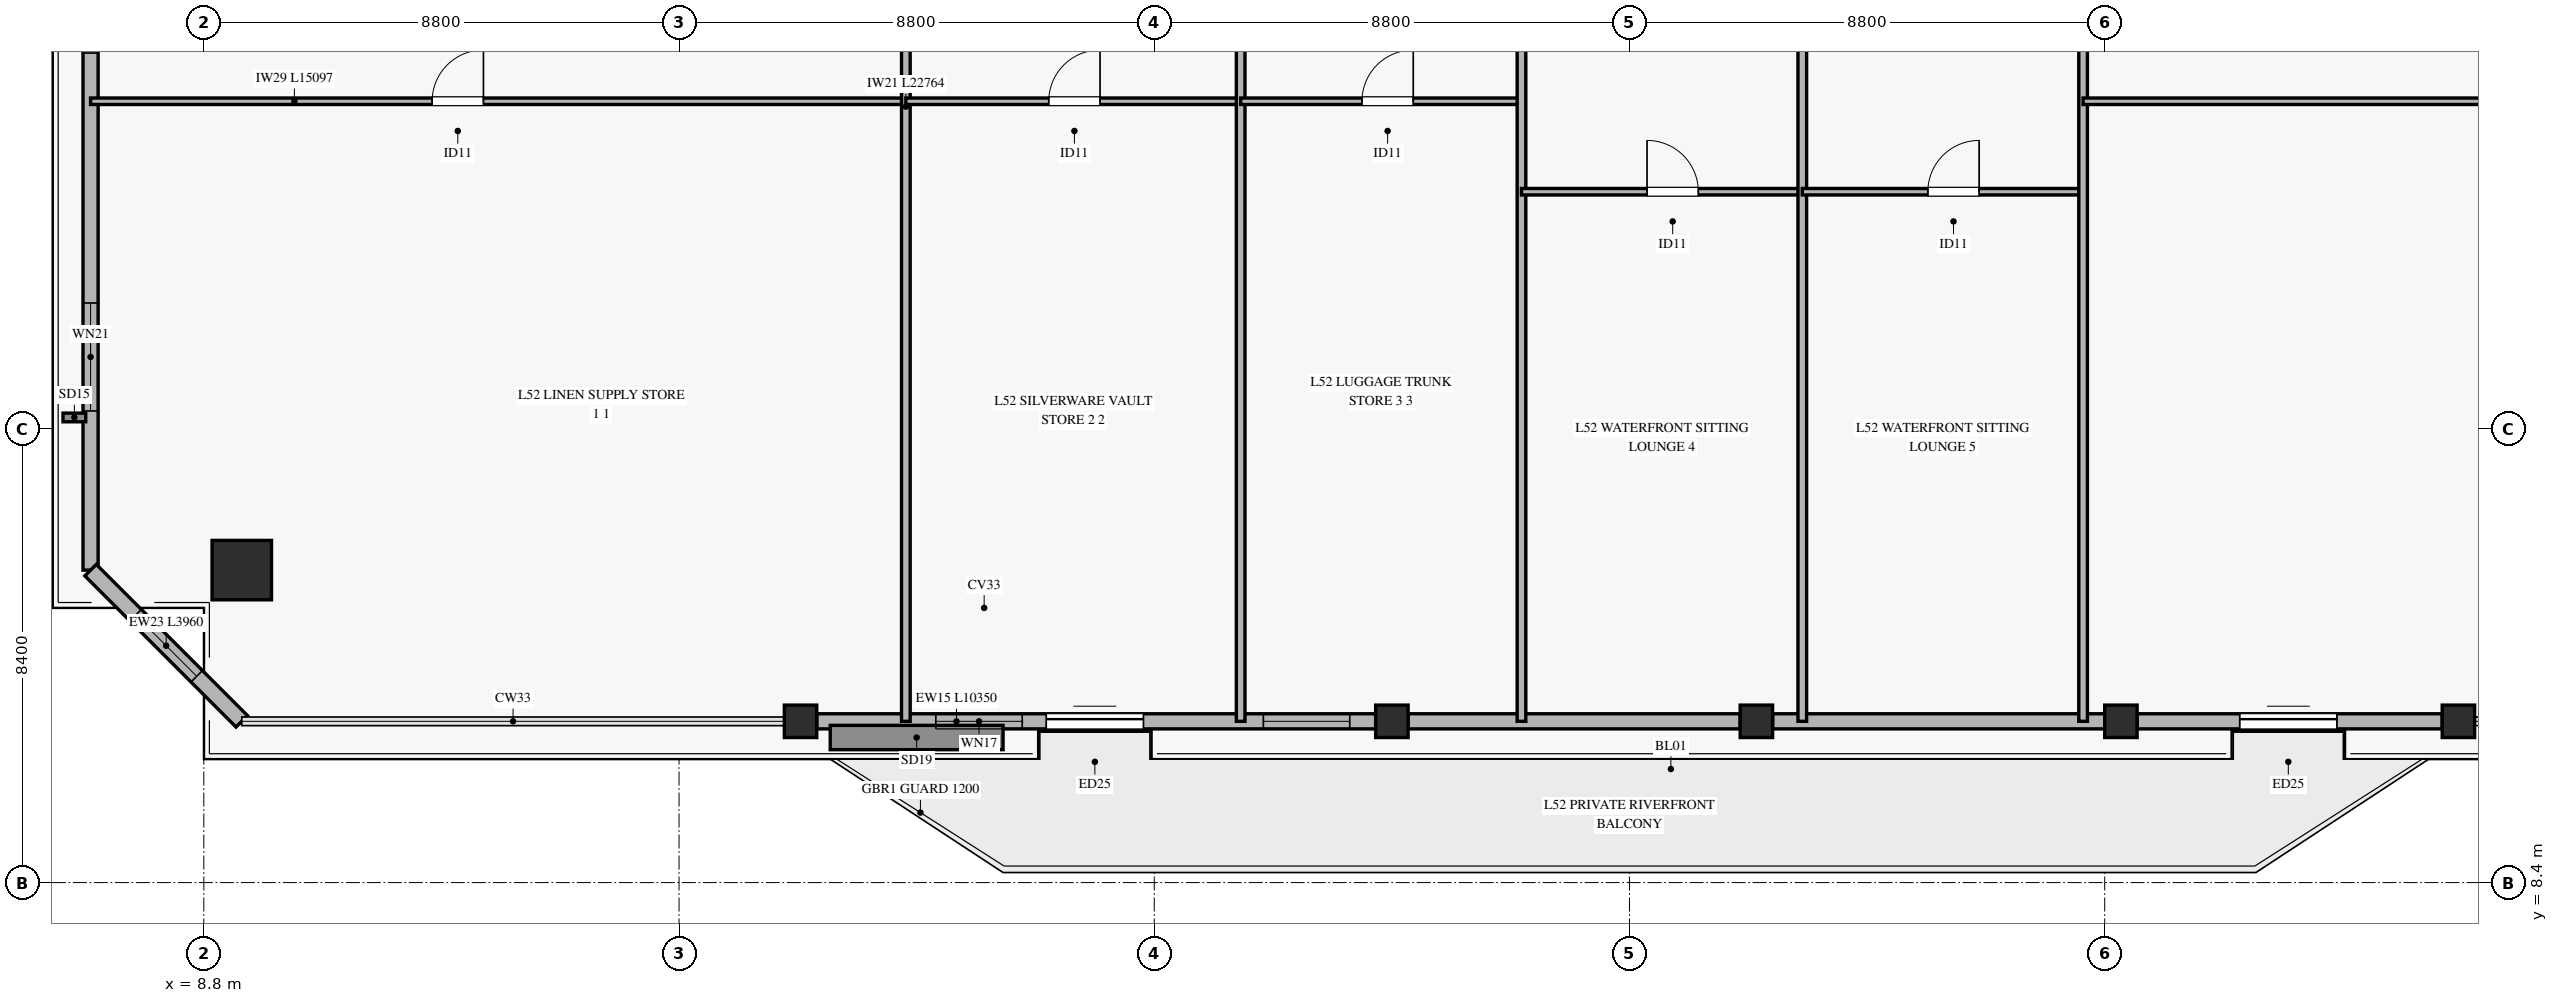
"""IFC4 building model, lengths in metres.
Left out: names, types, materials, properties, quantities, classifications, styles, units other than length and angle.
Written with IfcOpenShell. Run it as: python <this file> out.ifc"""

import sys

from ifc_helpers import new_model, si_unit, direction, frame, frame_2d, origin, origin_2d, place, context, subcontext, project, spatial, rectangle, hollow_rectangle, extrude, source, transform, mapped, element, fill, save


model = new_model("IFC4")
c1 = context("Model", 3, precision=1e-05, world=origin(), true_north=direction((0.0, 1.0)))
c2 = subcontext(c1, "Body", "Model", "MODEL_VIEW")
j1 = project(units=[si_unit("LENGTHUNIT", "METRE"), si_unit("PLANEANGLEUNIT", "RADIAN")], contexts=[c1])
p1 = place(None, origin())
s1 = spatial("IfcSite", under=j1, at=p1, CompositionType="ELEMENT")
p2 = place(p1, origin())
s2 = spatial("IfcBuilding", under=s1, at=p2, CompositionType="ELEMENT")
p3 = place(p2, frame((0.0, 0.0, 206.2)))
s3 = spatial("IfcBuildingStorey", under=s2, at=p3, CompositionType="ELEMENT", Elevation=206.2)
m1 = source(origin(), c2, "Body", "SweptSolid", [
    extrude(hollow_rectangle(XDim=1.1, YDim=1.1, WallThickness=0.05, at=origin_2d()), origin(), (0.0, 0.0, 1.0), 3.27),
])
p4 = place(p3, frame((9.503, 14.186, 0.0), z_axis=(0.0, 0.0, 1.0), x_axis=(1.0, 0.0, 0.0)))
e1 = element("IfcColumn", 1, at=p4, inside=s3, PredefinedType="COLUMN", context=c2, shape_type="MappedRepresentation", body=[
    mapped(m1, transform((0.0, 0.0, 0.0), x_axis=(1.0, 0.0, 0.0), y_axis=(0.0, 1.0, 0.0), z_axis=(0.0, 0.0, 1.0), scale=1.0)),
])
m2 = source(origin(), c2, "Body", "SweptSolid", [
    extrude(hollow_rectangle(XDim=0.6, YDim=0.6, WallThickness=0.028, at=origin_2d()), origin(), (0.0, 0.0, 1.0), 3.27),
])
for number, where, z_axis, x_axis in (
    (2, (19.85, 11.386, 0.0), (0.0, 0.0, 1.0), (1.0, 0.0, 0.0)),
    (3, (30.8, 11.386, 0.0), (0.0, 0.0, 1.0), (1.0, 0.0, 0.0)),
    (4, (37.55, 11.386, 0.0), (0.0, 0.0, 1.0), (1.0, 0.0, 0.0)),
    (5, (44.3, 11.386, 0.0), (0.0, 0.0, 1.0), (1.0, 0.0, 0.0)),
    (6, (50.55, 11.386, 0.0), (0.0, 0.0, 1.0), (1.0, 0.0, 0.0)),
):
    element("IfcColumn", number, at=place(p3, frame(where, z_axis=z_axis, x_axis=x_axis)), inside=s3, PredefinedType="COLUMN", context=c2, shape_type="MappedRepresentation", body=[
        mapped(m2, transform((0.0, 0.0, 0.0), x_axis=(1.0, 0.0, 0.0), y_axis=(0.0, 1.0, 0.0), z_axis=(0.0, 0.0, 1.0), scale=1.0)),
    ])
p5 = place(p3, frame((20.15, 11.386, 0.0), z_axis=(0.0, 0.0, 1.0), x_axis=(1.0, 0.0, 0.0)))
e7 = element("IfcWall", 7, at=p5, inside=s3, PredefinedType="SOLIDWALL", context=c2, shape_type="SweptSolid", body=[
    extrude(rectangle(XDim=10.35, YDim=0.28, at=frame_2d((5.175, 0.0))), origin(), (0.0, 0.0, 1.0), 2.75),
])
p6 = place(p5, frame((4.25, 0.0, 0.0)))
e8 = element("IfcOpeningElement", 8, at=p6, cuts=e7, PredefinedType="OPENING", context=c2, shape_type="SweptSolid", body=[
    extrude(rectangle(XDim=1.8, YDim=2.25, at=frame_2d((0.9, 1.125))), frame((0.0, 0.15, 0.0), z_axis=(0.0, -1.0, 0.0), x_axis=(1.0, 0.0, 0.0)), (0.0, 0.0, 1.0), 0.3),
])
p7 = place(p5, frame((2.205, 0.0, 0.45)))
e9 = element("IfcOpeningElement", 9, at=p7, cuts=e7, PredefinedType="OPENING", context=c2, shape_type="SweptSolid", body=[
    extrude(rectangle(XDim=1.6, YDim=2.0, at=frame_2d((0.8, 1.0))), frame((0.0, 0.15, 0.0), z_axis=(0.0, -1.0, 0.0), x_axis=(1.0, 0.0, 0.0)), (0.0, 0.0, 1.0), 0.3),
])
p8 = place(p5, frame((8.27, 0.0, 0.45)))
e10 = element("IfcOpeningElement", 10, at=p8, cuts=e7, PredefinedType="OPENING", context=c2, shape_type="SweptSolid", body=[
    extrude(rectangle(XDim=1.6, YDim=2.0, at=frame_2d((0.8, 1.0))), frame((0.0, 0.15, 0.0), z_axis=(0.0, -1.0, 0.0), x_axis=(1.0, 0.0, 0.0)), (0.0, 0.0, 1.0), 0.3),
])
for number, where, z_axis, x_axis in (
    (11, (31.1, 11.386, 0.0), (0.0, 0.0, 1.0), (1.0, 0.0, 0.0)),
    (12, (37.85, 11.386, 0.0), (0.0, 0.0, 1.0), (1.0, 0.0, 0.0)),
):
    element("IfcWall", number, at=place(p3, frame(where, z_axis=z_axis, x_axis=x_axis)), inside=s3, PredefinedType="SOLIDWALL", context=c2, shape_type="SweptSolid", body=[
        extrude(rectangle(XDim=6.15, YDim=0.28, at=frame_2d((3.075, 0.0))), origin(), (0.0, 0.0, 1.0), 2.75),
    ])
p9 = place(p3, frame((44.6, 11.386, 0.0), z_axis=(0.0, 0.0, 1.0), x_axis=(1.0, 0.0, 0.0)))
e13 = element("IfcWall", 13, at=p9, inside=s3, PredefinedType="SOLIDWALL", context=c2, shape_type="SweptSolid", body=[
    extrude(rectangle(XDim=5.65, YDim=0.28, at=frame_2d((2.825, 0.0))), origin(), (0.0, 0.0, 1.0), 2.75),
])
p10 = place(p9, frame((1.9, 0.0, 0.0)))
e14 = element("IfcOpeningElement", 14, at=p10, cuts=e13, PredefinedType="OPENING", context=c2, shape_type="SweptSolid", body=[
    extrude(rectangle(XDim=1.8, YDim=2.25, at=frame_2d((0.9, 1.125))), frame((0.0, 0.15, 0.0), z_axis=(0.0, -1.0, 0.0), x_axis=(1.0, 0.0, 0.0)), (0.0, 0.0, 1.0), 0.3),
])
p11 = place(p3, frame((6.703, 14.186, 0.0), z_axis=(0.0, 0.0, 1.0), x_axis=(0.0, 1.0, 0.0)))
e15 = element("IfcWall", 15, at=p11, inside=s3, PredefinedType="SOLIDWALL", context=c2, shape_type="SweptSolid", body=[
    extrude(rectangle(XDim=14.257, YDim=0.28, at=frame_2d((7.128, 0.0))), origin(), (0.0, 0.0, 1.0), 2.75),
])
p12 = place(p11, frame((2.947, 0.0, 0.45)))
e16 = element("IfcOpeningElement", 16, at=p12, cuts=e15, PredefinedType="OPENING", context=c2, shape_type="SweptSolid", body=[
    extrude(rectangle(XDim=2.0, YDim=2.0, at=frame_2d((1.0, 1.0))), frame((0.0, 0.15, 0.0), z_axis=(0.0, -1.0, 0.0), x_axis=(1.0, 0.0, 0.0)), (0.0, 0.0, 1.0), 0.3),
])
p13 = place(p11, frame((9.575, 0.0, 0.45)))
e17 = element("IfcOpeningElement", 17, at=p13, cuts=e15, PredefinedType="OPENING", context=c2, shape_type="SweptSolid", body=[
    extrude(rectangle(XDim=2.0, YDim=2.0, at=frame_2d((1.0, 1.0))), frame((0.0, 0.15, 0.0), z_axis=(0.0, -1.0, 0.0), x_axis=(1.0, 0.0, 0.0)), (0.0, 0.0, 1.0), 0.3),
])
p14 = place(p3, frame((6.703, 14.186, 0.0), z_axis=(0.0, 0.0, 1.0), x_axis=(0.707106781187, -0.707106781187, 0.0)))
e18 = element("IfcWall", 18, at=p14, inside=s3, PredefinedType="SOLIDWALL", context=c2, shape_type="SweptSolid", body=[
    extrude(rectangle(XDim=3.96, YDim=0.3, at=frame_2d((1.98, 0.0))), origin(), (0.0, 0.0, 1.0), 2.75),
])
p15 = place(p14, frame((1.18, 0.0, 0.45)))
e19 = element("IfcOpeningElement", 19, at=p15, cuts=e18, PredefinedType="OPENING", context=c2, shape_type="SweptSolid", body=[
    extrude(rectangle(XDim=1.6, YDim=2.0, at=frame_2d((0.8, 1.0))), frame((0.0, 0.16, 0.0), z_axis=(0.0, -1.0, 0.0), x_axis=(1.0, 0.0, 0.0)), (0.0, 0.0, 1.0), 0.32),
])
p16 = place(p3, frame((6.703, 22.868, 0.0), z_axis=(0.0, 0.0, 1.0), x_axis=(1.0, 0.0, 0.0)))
e20 = element("IfcWall", 20, at=p16, inside=s3, PredefinedType="PARTITIONING", context=c2, shape_type="SweptSolid", body=[
    extrude(rectangle(XDim=15.097, YDim=0.12, at=frame_2d((7.549, 0.0))), origin(), (0.0, 0.0, 1.0), 2.455),
])
p17 = place(p16, frame((6.325, 0.0, 0.0)))
e21 = element("IfcOpeningElement", 21, at=p17, cuts=e20, PredefinedType="OPENING", context=c2, shape_type="SweptSolid", body=[
    extrude(rectangle(XDim=0.95, YDim=2.1, at=frame_2d((0.475, 1.05))), frame((0.0, 0.07, 0.0), z_axis=(0.0, -1.0, 0.0), x_axis=(1.0, 0.0, 0.0)), (0.0, 0.0, 1.0), 0.14),
])
p18 = place(p3, frame((21.8, 11.386, 0.0), z_axis=(0.0, 0.0, 1.0), x_axis=(0.0, 1.0, 0.0)))
e22 = element("IfcWall", 22, at=p18, inside=s3, PredefinedType="PARTITIONING", context=c2, shape_type="SweptSolid", body=[
    extrude(rectangle(XDim=22.764, YDim=0.16, at=frame_2d((11.382, 0.0))), origin(), (0.0, 0.0, 1.0), 2.755),
])
p19 = place(p3, frame((21.8, 22.868, 0.0), z_axis=(0.0, 0.0, 1.0), x_axis=(1.0, 0.0, 0.0)))
e23 = element("IfcWall", 23, at=p19, inside=s3, PredefinedType="PARTITIONING", context=c2, shape_type="SweptSolid", body=[
    extrude(rectangle(XDim=6.2, YDim=0.12, at=frame_2d((3.1, 0.0))), origin(), (0.0, 0.0, 1.0), 3.27),
])
p20 = place(p19, frame((2.646, 0.0, 0.0)))
e24 = element("IfcOpeningElement", 24, at=p20, cuts=e23, PredefinedType="OPENING", context=c2, shape_type="SweptSolid", body=[
    extrude(rectangle(XDim=0.95, YDim=2.1, at=frame_2d((0.475, 1.05))), frame((0.0, 0.07, 0.0), z_axis=(0.0, -1.0, 0.0), x_axis=(1.0, 0.0, 0.0)), (0.0, 0.0, 1.0), 0.14),
])
p21 = place(p3, frame((28.0, 11.386, 0.0), z_axis=(0.0, 0.0, 1.0), x_axis=(0.0, 1.0, 0.0)))
e25 = element("IfcWall", 25, at=p21, inside=s3, PredefinedType="PARTITIONING", context=c2, shape_type="SweptSolid", body=[
    extrude(rectangle(XDim=22.764, YDim=0.16, at=frame_2d((11.382, 0.0))), origin(), (0.0, 0.0, 1.0), 2.755),
])
p22 = place(p3, frame((28.0, 22.868, 0.0), z_axis=(0.0, 0.0, 1.0), x_axis=(1.0, 0.0, 0.0)))
e26 = element("IfcWall", 26, at=p22, inside=s3, PredefinedType="PARTITIONING", context=c2, shape_type="SweptSolid", body=[
    extrude(rectangle(XDim=5.2, YDim=0.12, at=frame_2d((2.6, 0.0))), origin(), (0.0, 0.0, 1.0), 2.455),
])
p23 = place(p22, frame((2.246, 0.0, 0.0)))
e27 = element("IfcOpeningElement", 27, at=p23, cuts=e26, PredefinedType="OPENING", context=c2, shape_type="SweptSolid", body=[
    extrude(rectangle(XDim=0.95, YDim=2.1, at=frame_2d((0.475, 1.05))), frame((0.0, 0.07, 0.0), z_axis=(0.0, -1.0, 0.0), x_axis=(1.0, 0.0, 0.0)), (0.0, 0.0, 1.0), 0.14),
])
p24 = place(p3, frame((33.2, 11.386, 0.0), z_axis=(0.0, 0.0, 1.0), x_axis=(0.0, 1.0, 0.0)))
e28 = element("IfcWall", 28, at=p24, inside=s3, PredefinedType="PARTITIONING", context=c2, shape_type="SweptSolid", body=[
    extrude(rectangle(XDim=22.764, YDim=0.16, at=frame_2d((11.382, 0.0))), origin(), (0.0, 0.0, 1.0), 2.755),
])
p25 = place(p3, frame((33.2, 21.193, 0.0), z_axis=(0.0, 0.0, 1.0), x_axis=(1.0, 0.0, 0.0)))
e29 = element("IfcWall", 29, at=p25, inside=s3, PredefinedType="PARTITIONING", context=c2, shape_type="SweptSolid", body=[
    extrude(rectangle(XDim=5.2, YDim=0.12, at=frame_2d((2.6, 0.0))), origin(), (0.0, 0.0, 1.0), 2.455),
])
p26 = place(p25, frame((2.325, 0.0, 0.0)))
e30 = element("IfcOpeningElement", 30, at=p26, cuts=e29, PredefinedType="OPENING", context=c2, shape_type="SweptSolid", body=[
    extrude(rectangle(XDim=0.95, YDim=2.1, at=frame_2d((0.475, 1.05))), frame((0.0, 0.07, 0.0), z_axis=(0.0, -1.0, 0.0), x_axis=(1.0, 0.0, 0.0)), (0.0, 0.0, 1.0), 0.14),
])
p27 = place(p3, frame((38.4, 11.386, 0.0), z_axis=(0.0, 0.0, 1.0), x_axis=(0.0, 1.0, 0.0)))
e31 = element("IfcWall", 31, at=p27, inside=s3, PredefinedType="PARTITIONING", context=c2, shape_type="SweptSolid", body=[
    extrude(rectangle(XDim=22.764, YDim=0.16, at=frame_2d((11.382, 0.0))), origin(), (0.0, 0.0, 1.0), 2.755),
])
p28 = place(p3, frame((38.4, 21.193, 0.0), z_axis=(0.0, 0.0, 1.0), x_axis=(1.0, 0.0, 0.0)))
e32 = element("IfcWall", 32, at=p28, inside=s3, PredefinedType="PARTITIONING", context=c2, shape_type="SweptSolid", body=[
    extrude(rectangle(XDim=5.2, YDim=0.12, at=frame_2d((2.6, 0.0))), origin(), (0.0, 0.0, 1.0), 3.27),
])
p29 = place(p28, frame((2.325, 0.0, 0.0)))
e33 = element("IfcOpeningElement", 33, at=p29, cuts=e32, PredefinedType="OPENING", context=c2, shape_type="SweptSolid", body=[
    extrude(rectangle(XDim=0.95, YDim=2.1, at=frame_2d((0.475, 1.05))), frame((0.0, 0.07, 0.0), z_axis=(0.0, -1.0, 0.0), x_axis=(1.0, 0.0, 0.0)), (0.0, 0.0, 1.0), 0.14),
])
p30 = place(p3, frame((43.6, 11.386, 0.0), z_axis=(0.0, 0.0, 1.0), x_axis=(0.0, 1.0, 0.0)))
e34 = element("IfcWall", 34, at=p30, inside=s3, PredefinedType="PARTITIONING", context=c2, shape_type="SweptSolid", body=[
    extrude(rectangle(XDim=22.764, YDim=0.16, at=frame_2d((11.382, 0.0))), origin(), (0.0, 0.0, 1.0), 2.755),
])
p31 = place(p3, frame((43.6, 22.868, 0.0), z_axis=(0.0, 0.0, 1.0), x_axis=(1.0, 0.0, 0.0)))
e35 = element("IfcWall", 35, at=p31, inside=s3, PredefinedType="PARTITIONING", context=c2, shape_type="SweptSolid", body=[
    extrude(rectangle(XDim=20.098, YDim=0.12, at=frame_2d((10.049, 0.0))), origin(), (0.0, 0.0, 1.0), 2.455),
])
p32 = place(p31, frame((8.125, 0.0, 0.0)))
e36 = element("IfcOpeningElement", 36, at=p32, cuts=e35, PredefinedType="OPENING", context=c2, shape_type="SweptSolid", body=[
    extrude(rectangle(XDim=0.95, YDim=2.1, at=frame_2d((0.475, 1.05))), frame((0.0, 0.07, 0.0), z_axis=(0.0, -1.0, 0.0), x_axis=(1.0, 0.0, 0.0)), (0.0, 0.0, 1.0), 0.14),
])
m3 = source(origin(), c2, "Body", "SweptSolid", [
    extrude(rectangle(XDim=1.8, YDim=2.25, at=frame_2d((0.9, 1.125))), frame((0.0, 0.025, 0.0), z_axis=(0.0, -1.0, 0.0), x_axis=(1.0, 0.0, 0.0)), (0.0, 0.0, 1.0), 0.05),
])
p33 = place(p6, origin())
e37 = element("IfcDoor", 37, at=p33, inside=s3, OperationType="SLIDING_TO_LEFT", PredefinedType="DOOR", context=c2, shape_type="MappedRepresentation", body=[
    mapped(m3, transform((0.0, 0.0, 0.0), x_axis=(1.0, 0.0, 0.0), y_axis=(0.0, 1.0, 0.0), z_axis=(0.0, 0.0, 1.0), scale=1.0)),
])
fill(e8, e37)
m4 = source(origin(), c2, "Body", "SweptSolid", [
    extrude(rectangle(XDim=1.6, YDim=2.0, at=frame_2d((0.8, 1.0))), frame((0.0, 0.03, 0.0), z_axis=(0.0, -1.0, 0.0), x_axis=(1.0, 0.0, 0.0)), (0.0, 0.0, 1.0), 0.06),
])
p34 = place(p7, origin())
e38 = element("IfcWindow", 38, at=p34, inside=s3, PartitioningType="SINGLE_PANEL", PredefinedType="WINDOW", context=c2, shape_type="MappedRepresentation", body=[
    mapped(m4, transform((0.0, 0.0, 0.0), x_axis=(1.0, 0.0, 0.0), y_axis=(0.0, 1.0, 0.0), z_axis=(0.0, 0.0, 1.0), scale=1.0)),
])
fill(e9, e38)
p35 = place(p8, origin())
e39 = element("IfcWindow", 39, at=p35, inside=s3, PartitioningType="SINGLE_PANEL", PredefinedType="WINDOW", context=c2, shape_type="MappedRepresentation", body=[
    mapped(m4, transform((0.0, 0.0, 0.0), x_axis=(1.0, 0.0, 0.0), y_axis=(0.0, 1.0, 0.0), z_axis=(0.0, 0.0, 1.0), scale=1.0)),
])
fill(e10, e39)
p36 = place(p10, origin())
e40 = element("IfcDoor", 40, at=p36, inside=s3, OperationType="SLIDING_TO_LEFT", PredefinedType="DOOR", context=c2, shape_type="MappedRepresentation", body=[
    mapped(m3, transform((0.0, 0.0, 0.0), x_axis=(1.0, 0.0, 0.0), y_axis=(0.0, 1.0, 0.0), z_axis=(0.0, 0.0, 1.0), scale=1.0)),
])
fill(e14, e40)
m5 = source(origin(), c2, "Body", "SweptSolid", [
    extrude(rectangle(XDim=2.0, YDim=2.0, at=frame_2d((1.0, 1.0))), frame((0.0, 0.03, 0.0), z_axis=(0.0, -1.0, 0.0), x_axis=(1.0, 0.0, 0.0)), (0.0, 0.0, 1.0), 0.06),
])
p37 = place(p12, origin())
e41 = element("IfcWindow", 41, at=p37, inside=s3, PartitioningType="SINGLE_PANEL", PredefinedType="WINDOW", context=c2, shape_type="MappedRepresentation", body=[
    mapped(m5, transform((0.0, 0.0, 0.0), x_axis=(1.0, 0.0, 0.0), y_axis=(0.0, 1.0, 0.0), z_axis=(0.0, 0.0, 1.0), scale=1.0)),
])
fill(e16, e41)
p38 = place(p13, origin())
e42 = element("IfcWindow", 42, at=p38, inside=s3, PartitioningType="SINGLE_PANEL", PredefinedType="WINDOW", context=c2, shape_type="MappedRepresentation", body=[
    mapped(m5, transform((0.0, 0.0, 0.0), x_axis=(1.0, 0.0, 0.0), y_axis=(0.0, 1.0, 0.0), z_axis=(0.0, 0.0, 1.0), scale=1.0)),
])
fill(e17, e42)
p39 = place(p15, origin())
e43 = element("IfcWindow", 43, at=p39, inside=s3, PartitioningType="SINGLE_PANEL", PredefinedType="WINDOW", context=c2, shape_type="MappedRepresentation", body=[
    mapped(m4, transform((0.0, 0.0, 0.0), x_axis=(1.0, 0.0, 0.0), y_axis=(0.0, 1.0, 0.0), z_axis=(0.0, 0.0, 1.0), scale=1.0)),
])
fill(e19, e43)
m6 = source(origin(), c2, "Body", "SweptSolid", [
    extrude(rectangle(XDim=0.95, YDim=2.1, at=frame_2d((0.475, 1.05))), frame((0.0, 0.025, 0.0), z_axis=(0.0, -1.0, 0.0), x_axis=(1.0, 0.0, 0.0)), (0.0, 0.0, 1.0), 0.05),
])
p40 = place(p17, origin())
e44 = element("IfcDoor", 44, at=p40, inside=s3, OperationType="SINGLE_SWING_RIGHT", PredefinedType="DOOR", context=c2, shape_type="MappedRepresentation", body=[
    mapped(m6, transform((0.0, 0.0, 0.0), x_axis=(1.0, 0.0, 0.0), y_axis=(0.0, 1.0, 0.0), z_axis=(0.0, 0.0, 1.0), scale=1.0)),
])
fill(e21, e44)
p41 = place(p20, origin())
e45 = element("IfcDoor", 45, at=p41, inside=s3, OperationType="SINGLE_SWING_RIGHT", PredefinedType="DOOR", context=c2, shape_type="MappedRepresentation", body=[
    mapped(m6, transform((0.0, 0.0, 0.0), x_axis=(1.0, 0.0, 0.0), y_axis=(0.0, 1.0, 0.0), z_axis=(0.0, 0.0, 1.0), scale=1.0)),
])
fill(e24, e45)
p42 = place(p23, origin())
e46 = element("IfcDoor", 46, at=p42, inside=s3, OperationType="SINGLE_SWING_RIGHT", PredefinedType="DOOR", context=c2, shape_type="MappedRepresentation", body=[
    mapped(m6, transform((0.0, 0.0, 0.0), x_axis=(1.0, 0.0, 0.0), y_axis=(0.0, 1.0, 0.0), z_axis=(0.0, 0.0, 1.0), scale=1.0)),
])
fill(e27, e46)
p43 = place(p26, origin())
e47 = element("IfcDoor", 47, at=p43, inside=s3, OperationType="SINGLE_SWING_LEFT", PredefinedType="DOOR", context=c2, shape_type="MappedRepresentation", body=[
    mapped(m6, transform((0.0, 0.0, 0.0), x_axis=(1.0, 0.0, 0.0), y_axis=(0.0, 1.0, 0.0), z_axis=(0.0, 0.0, 1.0), scale=1.0)),
])
fill(e30, e47)
p44 = place(p29, origin())
e48 = element("IfcDoor", 48, at=p44, inside=s3, OperationType="SINGLE_SWING_RIGHT", PredefinedType="DOOR", context=c2, shape_type="MappedRepresentation", body=[
    mapped(m6, transform((0.0, 0.0, 0.0), x_axis=(1.0, 0.0, 0.0), y_axis=(0.0, 1.0, 0.0), z_axis=(0.0, 0.0, 1.0), scale=1.0)),
])
fill(e33, e48)
save(model, sys.argv[1])
